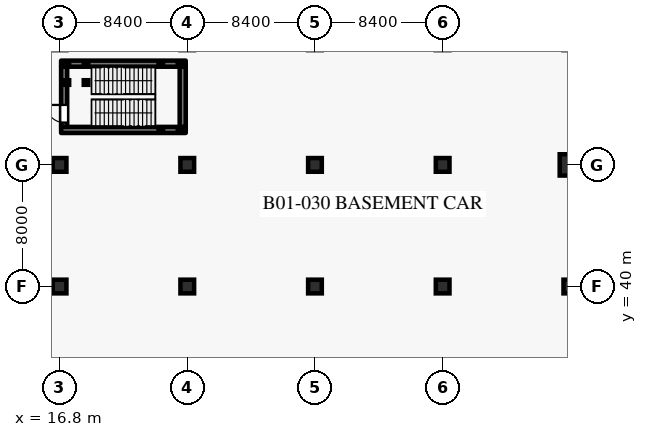
"""IFC4 building model, lengths in metres.
Left out: names, types, materials, properties, quantities, classifications, styles, units other than length and angle.
Written with IfcOpenShell. Run it as: python <this file> out.ifc"""

import sys

from ifc_helpers import new_model, si_unit, direction, frame, frame_2d, origin, origin_2d, place, context, subcontext, project, spatial, rectangle, hollow_rectangle, circle, extrude, element, fill, save


model = new_model("IFC4")
c1 = context("Model", 3, precision=1e-05, world=origin(), true_north=direction((0.0, 1.0)))
c2 = subcontext(c1, "Body", "Model", "MODEL_VIEW")
j1 = project(units=[si_unit("LENGTHUNIT", "METRE"), si_unit("PLANEANGLEUNIT", "RADIAN")], contexts=[c1])
p1 = place(None, origin())
s1 = spatial("IfcSite", under=j1, at=p1, CompositionType="ELEMENT")
p2 = place(p1, origin())
s2 = spatial("IfcBuilding", under=s1, at=p2, CompositionType="ELEMENT")
p3 = place(p2, frame((0.0, 0.0, -5.4)))
s3 = spatial("IfcBuildingStorey", under=s2, at=p3, CompositionType="ELEMENT", Elevation=-5.4)
for number, where, z_axis, x_axis in (
    (1, (16.8, 40.0, 0.0), (0.0, 0.0, 1.0), (1.0, 0.0, 0.0)),
    (2, (16.8, 48.0, 0.0), (0.0, 0.0, 1.0), (1.0, 0.0, 0.0)),
    (3, (25.2, 40.0, 0.0), (0.0, 0.0, 1.0), (1.0, 0.0, 0.0)),
    (4, (25.2, 48.0, 0.0), (0.0, 0.0, 1.0), (1.0, 0.0, 0.0)),
    (5, (33.6, 40.0, 0.0), (0.0, 0.0, 1.0), (1.0, 0.0, 0.0)),
    (6, (33.6, 48.0, 0.0), (0.0, 0.0, 1.0), (1.0, 0.0, 0.0)),
    (7, (42.0, 40.0, 0.0), (0.0, 0.0, 1.0), (1.0, 0.0, 0.0)),
    (8, (42.0, 48.0, 0.0), (0.0, 0.0, 1.0), (1.0, 0.0, 0.0)),
    (9, (50.4, 40.0, 0.0), (0.0, 0.0, 1.0), (1.0, 0.0, 0.0)),
):
    element("IfcColumn", number, at=place(p3, frame(where, z_axis=z_axis, x_axis=x_axis)), inside=s3, PredefinedType="COLUMN", context=c2, shape_type="SweptSolid", body=[
        extrude(rectangle(XDim=0.9, YDim=0.9, at=origin_2d()), origin(), (0.0, 0.0, 1.0), 5.4),
    ])
p4 = place(p3, frame((50.4, 48.0, 0.0), z_axis=(0.0, 0.0, 1.0), x_axis=(1.0, 0.0, 0.0)))
e10 = element("IfcColumn", 10, at=p4, inside=s3, PredefinedType="COLUMN", context=c2, shape_type="SweptSolid", body=[
    extrude(circle(Radius=0.7, at=origin_2d()), origin(), (0.0, 0.0, 1.0), 5.4),
])
p5 = place(p3, frame((16.9, 50.3, 0.0), z_axis=(0.0, 0.0, 1.0), x_axis=(1.0, 0.0, 0.0)))
e11 = element("IfcWall", 11, at=p5, inside=s3, PredefinedType="SHEAR", context=c2, shape_type="SweptSolid", body=[
    extrude(rectangle(XDim=8.2, YDim=0.4, at=frame_2d((4.1, 0.0))), origin(), (0.0, 0.0, 1.0), 4.995),
])
p6 = place(p3, frame((24.9, 50.505, 0.0), z_axis=(0.0, 0.0, 1.0), x_axis=(0.0, 1.0, 0.0)))
e12 = element("IfcWall", 12, at=p6, inside=s3, PredefinedType="SHEAR", context=c2, shape_type="SweptSolid", body=[
    extrude(rectangle(XDim=3.95, YDim=0.4, at=frame_2d((1.975, 0.0))), origin(), (0.0, 0.0, 1.0), 4.995),
])
p7 = place(p3, frame((16.9, 54.66, 0.0), z_axis=(0.0, 0.0, 1.0), x_axis=(1.0, 0.0, 0.0)))
e13 = element("IfcWall", 13, at=p7, inside=s3, PredefinedType="SHEAR", context=c2, shape_type="SweptSolid", body=[
    extrude(rectangle(XDim=8.2, YDim=0.4, at=frame_2d((4.1, 0.0))), origin(), (0.0, 0.0, 1.0), 4.995),
])
p8 = place(p3, frame((17.1, 50.505, 0.0), z_axis=(0.0, 0.0, 1.0), x_axis=(0.0, 1.0, 0.0)))
e14 = element("IfcWall", 14, at=p8, inside=s3, PredefinedType="SHEAR", context=c2, shape_type="SweptSolid", body=[
    extrude(rectangle(XDim=3.95, YDim=0.4, at=frame_2d((1.975, 0.0))), origin(), (0.0, 0.0, 1.0), 4.995),
])
p9 = place(p8, frame((0.28, 0.0, 0.0)))
e15 = element("IfcOpeningElement", 15, at=p9, cuts=e14, PredefinedType="OPENING", context=c2, shape_type="SweptSolid", body=[
    extrude(rectangle(XDim=1.16, YDim=2.2, at=frame_2d((0.58, 1.1))), frame((0.0, 0.21, 0.0), z_axis=(0.0, -1.0, 0.0), x_axis=(1.0, 0.0, 0.0)), (0.0, 0.0, 1.0), 0.42),
])
for number, where, z_axis, x_axis in (
    (16, (17.28, 53.42, 0.0), (0.0, 0.0, 1.0), (1.0, 0.0, 0.0)),
    (17, (17.28, 54.66, 0.0), (0.0, 0.0, 1.0), (1.0, 0.0, 0.0)),
    (18, (18.54, 53.42, 0.0), (0.0, 0.0, 1.0), (1.0, 0.0, 0.0)),
    (19, (18.54, 54.66, 0.0), (0.0, 0.0, 1.0), (1.0, 0.0, 0.0)),
):
    element("IfcColumn", number, at=place(p3, frame(where, z_axis=z_axis, x_axis=x_axis)), inside=s3, PredefinedType="COLUMN", context=c2, shape_type="SweptSolid", body=[
        extrude(hollow_rectangle(XDim=0.3, YDim=0.3, WallThickness=0.012, at=origin_2d()), origin(), (0.0, 0.0, 1.0), 5.22),
    ])
for number, where, z_axis, x_axis in (
    (20, (23.46, 50.3, 0.0), (0.0, 0.0, 1.0), (1.0, 0.0, 0.0)),
    (21, (23.46, 54.66, 0.0), (0.0, 0.0, 1.0), (1.0, 0.0, 0.0)),
    (22, (24.72, 50.3, 0.0), (0.0, 0.0, 1.0), (1.0, 0.0, 0.0)),
    (23, (24.72, 54.66, 0.0), (0.0, 0.0, 1.0), (1.0, 0.0, 0.0)),
):
    element("IfcColumn", number, at=place(p3, frame(where, z_axis=z_axis, x_axis=x_axis)), inside=s3, PredefinedType="COLUMN", context=c2, shape_type="SweptSolid", body=[
        extrude(hollow_rectangle(XDim=0.3, YDim=0.3, WallThickness=0.012, at=origin_2d()), origin(), (0.0, 0.0, 1.0), 2.52),
    ])
p10 = place(p9, origin())
e24 = element("IfcDoor", 24, at=p10, inside=s3, OperationType="SINGLE_SWING_RIGHT", PredefinedType="DOOR", context=c2, shape_type="SweptSolid", body=[
    extrude(rectangle(XDim=1.16, YDim=2.2, at=frame_2d((0.58, 1.1))), frame((0.0, 0.025, 0.0), z_axis=(0.0, -1.0, 0.0), x_axis=(1.0, 0.0, 0.0)), (0.0, 0.0, 1.0), 0.05),
])
fill(e15, e24)
save(model, sys.argv[1])
